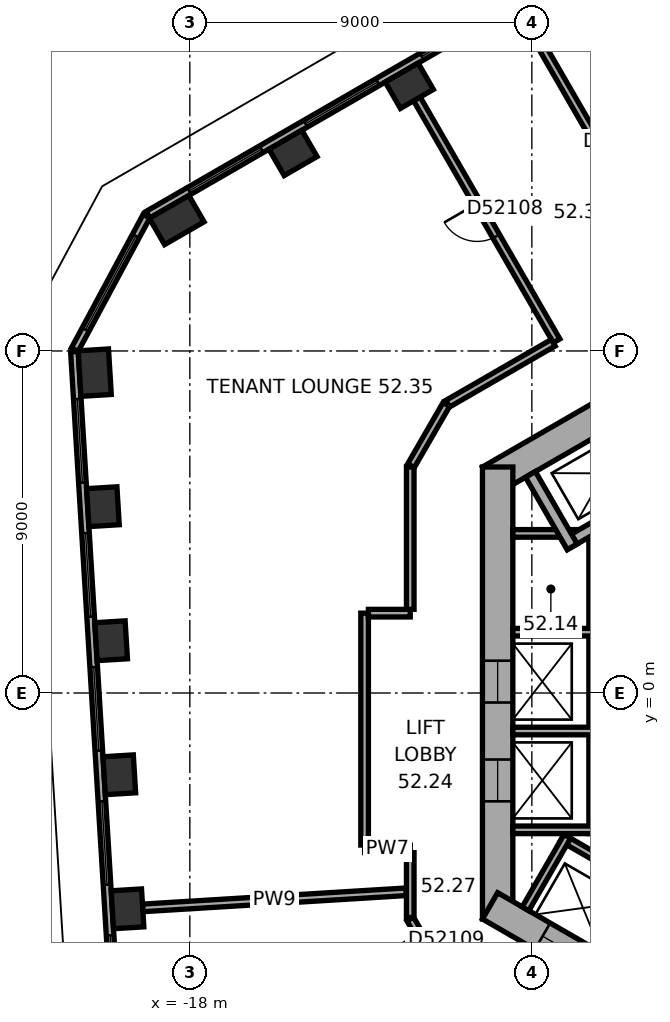
"""IFC4 building model, lengths in metres.
Left out: names, types, materials, properties, quantities, classifications, styles, units other than length and angle.
Written with IfcOpenShell. Run it as: python <this file> out.ifc"""

import sys

from ifc_helpers import new_model, si_unit, direction, frame, frame_2d, origin, origin_2d, place, context, subcontext, project, spatial, rectangle, extrude, element, fill, save


model = new_model("IFC4")
c1 = context("Model", 3, precision=1e-05, world=origin(), true_north=direction((0.0, 1.0)))
c2 = subcontext(c1, "Body", "Model", "MODEL_VIEW")
j1 = project(units=[si_unit("LENGTHUNIT", "METRE"), si_unit("PLANEANGLEUNIT", "RADIAN")], contexts=[c1])
p1 = place(None, origin())
s1 = spatial("IfcSite", under=j1, at=p1, CompositionType="ELEMENT")
p2 = place(p1, origin())
s2 = spatial("IfcBuilding", under=s1, at=p2, CompositionType="ELEMENT")
p3 = place(p2, frame((0.0, 0.0, 210.6)))
s3 = spatial("IfcBuildingStorey", under=s2, at=p3, CompositionType="ELEMENT", Elevation=210.6)
for number, where, z_axis, x_axis in (
    (1, (-12.225, 15.978, 0.0), (0.0, 0.0, 1.0), (-0.866, -0.5, 0.0)),
    (2, (-15.285, 14.211, 0.0), (0.0, 0.0, 1.0), (-0.866, -0.5, 0.0)),
):
    element("IfcColumn", number, at=place(p3, frame(where, z_axis=z_axis, x_axis=x_axis)), inside=s3, PredefinedType="COLUMN", context=c2, shape_type="SweptSolid", body=[
        extrude(rectangle(XDim=1.0, YDim=0.8, at=origin_2d()), origin(), (0.0, 0.0, 1.0), 3.7),
    ])
for number, where, z_axis, x_axis in (
    (3, (-18.345, 12.445, 0.0), (0.0, 0.0, 1.0), (-0.866, -0.5, 0.0)),
    (4, (-20.503, 8.429, 0.0), (0.0, 0.0, 1.0), (0.061, -0.998, 0.0)),
):
    element("IfcColumn", number, at=place(p3, frame(where, z_axis=z_axis, x_axis=x_axis)), inside=s3, PredefinedType="COLUMN", context=c2, shape_type="SweptSolid", body=[
        extrude(rectangle(XDim=1.2, YDim=0.8, at=origin_2d()), origin(), (0.0, 0.0, 1.0), 3.7),
    ])
for number, where, z_axis, x_axis in (
    (5, (-20.287, 4.902, 0.0), (0.0, 0.0, 1.0), (0.061, -0.998, 0.0)),
    (6, (-20.071, 1.375, 0.0), (0.0, 0.0, 1.0), (0.061, -0.998, 0.0)),
    (7, (-19.856, -2.152, 0.0), (0.0, 0.0, 1.0), (0.061, -0.998, 0.0)),
    (8, (-19.64, -5.679, 0.0), (0.0, 0.0, 1.0), (0.061, -0.998, 0.0)),
):
    element("IfcColumn", number, at=place(p3, frame(where, z_axis=z_axis, x_axis=x_axis)), inside=s3, PredefinedType="COLUMN", context=c2, shape_type="SweptSolid", body=[
        extrude(rectangle(XDim=1.0, YDim=0.8, at=origin_2d()), origin(), (0.0, 0.0, 1.0), 3.7),
    ])
p4 = place(p3, frame((0.2, 11.547, 0.0), z_axis=(0.0, 0.0, 1.0), x_axis=(-0.866023897231, -0.500002609418, 0.0)))
e9 = element("IfcWall", 9, at=p4, inside=s3, PredefinedType="SHEAR", context=c2, shape_type="SweptSolid", body=[
    extrude(rectangle(XDim=11.894, YDim=0.8, at=frame_2d((5.947, 0.0))), origin(), (0.0, 0.0, 1.0), 3.7),
])
p5 = place(p4, frame((6.147, 0.0, 0.0)))
e10 = element("IfcOpeningElement", 10, at=p5, cuts=e9, PredefinedType="OPENING", context=c2, shape_type="SweptSolid", body=[
    extrude(rectangle(XDim=1.5, YDim=2.1, at=frame_2d((0.75, 1.05))), frame((0.0, 0.41, 0.0), z_axis=(0.0, -1.0, 0.0), x_axis=(1.0, 0.0, 0.0)), (0.0, 0.0, 1.0), 0.82),
])
p6 = place(p4, frame((2.997, 0.0, 0.0)))
e11 = element("IfcOpeningElement", 11, at=p6, cuts=e9, PredefinedType="OPENING", context=c2, shape_type="SweptSolid", body=[
    extrude(rectangle(XDim=0.9, YDim=2.1, at=frame_2d((0.45, 1.05))), frame((0.0, 0.41, 0.0), z_axis=(0.0, -1.0, 0.0), x_axis=(1.0, 0.0, 0.0)), (0.0, 0.0, 1.0), 0.82),
])
p7 = place(p3, frame((-9.9, 5.947, 0.0), z_axis=(0.0, 0.0, 1.0), x_axis=(0.0, -1.0, 0.0)))
e12 = element("IfcWall", 12, at=p7, inside=s3, PredefinedType="SHEAR", context=c2, shape_type="SweptSolid", body=[
    extrude(rectangle(XDim=11.894, YDim=0.8, at=frame_2d((5.947, 0.0))), origin(), (0.0, 0.0, 1.0), 3.7),
])
p8 = place(p7, frame((5.097, 0.0, 0.0)))
e13 = element("IfcOpeningElement", 13, at=p8, cuts=e12, PredefinedType="OPENING", context=c2, shape_type="SweptSolid", body=[
    extrude(rectangle(XDim=1.1, YDim=2.1, at=frame_2d((0.55, 1.05))), frame((0.0, 0.41, 0.0), z_axis=(0.0, -1.0, 0.0), x_axis=(1.0, 0.0, 0.0)), (0.0, 0.0, 1.0), 0.82),
])
p9 = place(p7, frame((7.697, 0.0, 0.0)))
e14 = element("IfcOpeningElement", 14, at=p9, cuts=e12, PredefinedType="OPENING", context=c2, shape_type="SweptSolid", body=[
    extrude(rectangle(XDim=1.1, YDim=2.1, at=frame_2d((0.55, 1.05))), frame((0.0, 0.41, 0.0), z_axis=(0.0, -1.0, 0.0), x_axis=(1.0, 0.0, 0.0)), (0.0, 0.0, 1.0), 0.82),
])
p10 = place(p3, frame((-10.1, -5.6, 0.0), z_axis=(0.0, 0.0, 1.0), x_axis=(0.866023897231, -0.500002609418, 0.0)))
e15 = element("IfcWall", 15, at=p10, inside=s3, PredefinedType="SHEAR", context=c2, shape_type="SweptSolid", body=[
    extrude(rectangle(XDim=11.894, YDim=0.8, at=frame_2d((5.947, 0.0))), origin(), (0.0, 0.0, 1.0), 3.7),
])
p11 = place(p10, frame((6.147, 0.0, 0.0)))
e16 = element("IfcOpeningElement", 16, at=p11, cuts=e15, PredefinedType="OPENING", context=c2, shape_type="SweptSolid", body=[
    extrude(rectangle(XDim=1.5, YDim=2.1, at=frame_2d((0.75, 1.05))), frame((0.0, 0.41, 0.0), z_axis=(0.0, -1.0, 0.0), x_axis=(1.0, 0.0, 0.0)), (0.0, 0.0, 1.0), 0.82),
])
p12 = place(p10, frame((1.597, 0.0, 0.0)))
e17 = element("IfcOpeningElement", 17, at=p12, cuts=e15, PredefinedType="OPENING", context=c2, shape_type="SweptSolid", body=[
    extrude(rectangle(XDim=1.1, YDim=2.1, at=frame_2d((0.55, 1.05))), frame((0.0, 0.41, 0.0), z_axis=(0.0, -1.0, 0.0), x_axis=(1.0, 0.0, 0.0)), (0.0, 0.0, 1.0), 0.82),
])
p13 = place(p10, frame((4.197, 0.0, 0.0)))
e18 = element("IfcOpeningElement", 18, at=p13, cuts=e15, PredefinedType="OPENING", context=c2, shape_type="SweptSolid", body=[
    extrude(rectangle(XDim=1.1, YDim=2.1, at=frame_2d((0.55, 1.05))), frame((0.0, 0.41, 0.0), z_axis=(0.0, -1.0, 0.0), x_axis=(1.0, 0.0, 0.0)), (0.0, 0.0, 1.0), 0.82),
])
p14 = place(p3, frame((-2.786, 22.005, 0.0), z_axis=(0.0, 0.0, 1.0), x_axis=(-0.866026555358, -0.49999800541, 0.0)))
e19 = element("IfcWall", 19, at=p14, inside=s3, PredefinedType="STANDARD", context=c2, shape_type="SweptSolid", body=[
    extrude(rectangle(XDim=18.841, YDim=0.2, at=frame_2d((9.421, 0.0))), origin(), (0.0, 0.0, 1.0), 3.7),
])
p15 = place(p14, frame((1.254, 0.0, 0.9)))
e20 = element("IfcOpeningElement", 20, at=p15, cuts=e19, PredefinedType="OPENING", context=c2, shape_type="SweptSolid", body=[
    extrude(rectangle(XDim=2.2, YDim=2.0, at=frame_2d((1.1, 1.0))), frame((0.0, 0.11, 0.0), z_axis=(0.0, -1.0, 0.0), x_axis=(1.0, 0.0, 0.0)), (0.0, 0.0, 1.0), 0.22),
])
p16 = place(p14, frame((4.788, 0.0, 0.9)))
e21 = element("IfcOpeningElement", 21, at=p16, cuts=e19, PredefinedType="OPENING", context=c2, shape_type="SweptSolid", body=[
    extrude(rectangle(XDim=2.2, YDim=2.0, at=frame_2d((1.1, 1.0))), frame((0.0, 0.11, 0.0), z_axis=(0.0, -1.0, 0.0), x_axis=(1.0, 0.0, 0.0)), (0.0, 0.0, 1.0), 0.22),
])
p17 = place(p14, frame((8.321, 0.0, 0.9)))
e22 = element("IfcOpeningElement", 22, at=p17, cuts=e19, PredefinedType="OPENING", context=c2, shape_type="SweptSolid", body=[
    extrude(rectangle(XDim=2.2, YDim=2.0, at=frame_2d((1.1, 1.0))), frame((0.0, 0.11, 0.0), z_axis=(0.0, -1.0, 0.0), x_axis=(1.0, 0.0, 0.0)), (0.0, 0.0, 1.0), 0.22),
])
p18 = place(p14, frame((11.855, 0.0, 0.9)))
e23 = element("IfcOpeningElement", 23, at=p18, cuts=e19, PredefinedType="OPENING", context=c2, shape_type="SweptSolid", body=[
    extrude(rectangle(XDim=2.2, YDim=2.0, at=frame_2d((1.1, 1.0))), frame((0.0, 0.11, 0.0), z_axis=(0.0, -1.0, 0.0), x_axis=(1.0, 0.0, 0.0)), (0.0, 0.0, 1.0), 0.22),
])
p19 = place(p14, frame((15.389, 0.0, 0.9)))
e24 = element("IfcOpeningElement", 24, at=p19, cuts=e19, PredefinedType="OPENING", context=c2, shape_type="SweptSolid", body=[
    extrude(rectangle(XDim=2.2, YDim=2.0, at=frame_2d((1.1, 1.0))), frame((0.0, 0.11, 0.0), z_axis=(0.0, -1.0, 0.0), x_axis=(1.0, 0.0, 0.0)), (0.0, 0.0, 1.0), 0.22),
])
p20 = place(p3, frame((-19.141, 12.545, 0.0), z_axis=(0.0, 0.0, 1.0), x_axis=(-0.473306370921, -0.880897882416, 0.0)))
e25 = element("IfcWall", 25, at=p20, inside=s3, PredefinedType="STANDARD", context=c2, shape_type="SweptSolid", body=[
    extrude(rectangle(XDim=3.983, YDim=0.2, at=frame_2d((1.991, 0.0))), origin(), (0.0, 0.0, 1.0), 3.7),
])
p21 = place(p20, frame((0.591, 0.0, 0.9)))
e26 = element("IfcOpeningElement", 26, at=p21, cuts=e25, PredefinedType="OPENING", context=c2, shape_type="SweptSolid", body=[
    extrude(rectangle(XDim=2.8, YDim=2.0, at=frame_2d((1.4, 1.0))), frame((0.0, 0.11, 0.0), z_axis=(0.0, -1.0, 0.0), x_axis=(1.0, 0.0, 0.0)), (0.0, 0.0, 1.0), 0.22),
])
p22 = place(p3, frame((-21.038, 8.984, 0.0), z_axis=(0.0, 0.0, 1.0), x_axis=(0.061043935634, -0.998135079998, 0.0)))
e27 = element("IfcWall", 27, at=p22, inside=s3, PredefinedType="STANDARD", context=c2, shape_type="SweptSolid", body=[
    extrude(rectangle(XDim=18.841, YDim=0.2, at=frame_2d((9.421, 0.0))), origin(), (0.0, 0.0, 1.0), 3.7),
])
p23 = place(p22, frame((1.253, 0.0, 0.9)))
e28 = element("IfcOpeningElement", 28, at=p23, cuts=e27, PredefinedType="OPENING", context=c2, shape_type="SweptSolid", body=[
    extrude(rectangle(XDim=2.2, YDim=2.0, at=frame_2d((1.1, 1.0))), frame((0.0, 0.11, 0.0), z_axis=(0.0, -1.0, 0.0), x_axis=(1.0, 0.0, 0.0)), (0.0, 0.0, 1.0), 0.22),
])
p24 = place(p22, frame((4.786, 0.0, 0.9)))
e29 = element("IfcOpeningElement", 29, at=p24, cuts=e27, PredefinedType="OPENING", context=c2, shape_type="SweptSolid", body=[
    extrude(rectangle(XDim=2.2, YDim=2.0, at=frame_2d((1.1, 1.0))), frame((0.0, 0.11, 0.0), z_axis=(0.0, -1.0, 0.0), x_axis=(1.0, 0.0, 0.0)), (0.0, 0.0, 1.0), 0.22),
])
p25 = place(p22, frame((8.32, 0.0, 0.9)))
e30 = element("IfcOpeningElement", 30, at=p25, cuts=e27, PredefinedType="OPENING", context=c2, shape_type="SweptSolid", body=[
    extrude(rectangle(XDim=2.2, YDim=2.0, at=frame_2d((1.1, 1.0))), frame((0.0, 0.11, 0.0), z_axis=(0.0, -1.0, 0.0), x_axis=(1.0, 0.0, 0.0)), (0.0, 0.0, 1.0), 0.22),
])
p26 = place(p22, frame((11.854, 0.0, 0.9)))
e31 = element("IfcOpeningElement", 31, at=p26, cuts=e27, PredefinedType="OPENING", context=c2, shape_type="SweptSolid", body=[
    extrude(rectangle(XDim=2.2, YDim=2.0, at=frame_2d((1.1, 1.0))), frame((0.0, 0.11, 0.0), z_axis=(0.0, -1.0, 0.0), x_axis=(1.0, 0.0, 0.0)), (0.0, 0.0, 1.0), 0.22),
])
p27 = place(p22, frame((15.387, 0.0, 0.9)))
e32 = element("IfcOpeningElement", 32, at=p27, cuts=e27, PredefinedType="OPENING", context=c2, shape_type="SweptSolid", body=[
    extrude(rectangle(XDim=2.2, YDim=2.0, at=frame_2d((1.1, 1.0))), frame((0.0, 0.11, 0.0), z_axis=(0.0, -1.0, 0.0), x_axis=(1.0, 0.0, 0.0)), (0.0, 0.0, 1.0), 0.22),
])
p28 = place(p3, frame((-7.4, 4.3, 0.0), z_axis=(0.0, 0.0, 1.0), x_axis=(0.0, -1.0, 0.0)))
e33 = element("IfcWall", 33, at=p28, inside=s3, PredefinedType="PARTITIONING", context=c2, shape_type="SweptSolid", body=[
    extrude(rectangle(XDim=8.0, YDim=0.2, at=frame_2d((4.0, 0.0))), origin(), (0.0, 0.0, 1.0), 3.35),
])
for number, where, z_axis, x_axis in (
    (34, (-7.3, 4.2, 0.0), (0.0, 0.0, 1.0), (-1.0, 0.0, 0.0)),
    (35, (-7.3, 1.6, 0.0), (0.0, 0.0, 1.0), (-1.0, 0.0, 0.0)),
    (36, (-7.3, -1.0, 0.0), (0.0, 0.0, 1.0), (-1.0, 0.0, 0.0)),
    (37, (-7.3, -3.6, 0.0), (0.0, 0.0, 1.0), (-1.0, 0.0, 0.0)),
):
    element("IfcWall", number, at=place(p3, frame(where, z_axis=z_axis, x_axis=x_axis)), inside=s3, PredefinedType="PARTITIONING", context=c2, shape_type="SweptSolid", body=[
        extrude(rectangle(XDim=2.2, YDim=0.2, at=frame_2d((1.1, 0.0))), origin(), (0.0, 0.0, 1.0), 3.35),
    ])
p29 = place(p3, frame((-8.203, -3.809, 0.0), z_axis=(0.0, 0.0, 1.0), x_axis=(0.866028230842, -0.499995103361, 0.0)))
e38 = element("IfcWall", 38, at=p29, inside=s3, PredefinedType="PARTITIONING", context=c2, shape_type="SweptSolid", body=[
    extrude(rectangle(XDim=5.4, YDim=0.2, at=frame_2d((2.7, 0.0))), origin(), (0.0, 0.0, 1.0), 3.35),
])
p30 = place(p3, frame((-8.067, -3.772, 0.0), z_axis=(0.0, 0.0, 1.0), x_axis=(-0.50002983664, -0.866008176907, 0.0)))
e39 = element("IfcWall", 39, at=p30, inside=s3, PredefinedType="PARTITIONING", context=c2, shape_type="SweptSolid", body=[
    extrude(rectangle(XDim=2.2, YDim=0.2, at=frame_2d((1.1, 0.0))), origin(), (0.0, 0.0, 1.0), 3.35),
])
p31 = place(p3, frame((-5.24, 5.577, 0.0), z_axis=(0.0, 0.0, 1.0), x_axis=(-0.866014461049, -0.500018952895, 0.0)))
e40 = element("IfcWall", 40, at=p31, inside=s3, PredefinedType="SHEAR", context=c2, shape_type="SweptSolid", body=[
    extrude(rectangle(XDim=3.35, YDim=0.3, at=frame_2d((1.675, 0.0))), origin(), (0.0, 0.0, 1.0), 3.35),
])
p32 = place(p3, frame((-7.937, 3.847, 0.0), z_axis=(0.0, 0.0, 1.0), x_axis=(-0.50002983664, 0.866008176907, 0.0)))
e41 = element("IfcWall", 41, at=p32, inside=s3, PredefinedType="SHEAR", context=c2, shape_type="SweptSolid", body=[
    extrude(rectangle(XDim=2.2, YDim=0.3, at=frame_2d((1.1, 0.0))), origin(), (0.0, 0.0, 1.0), 3.35),
])
p33 = place(p3, frame((-19.241, -5.654, 0.0), z_axis=(0.0, 0.0, 1.0), x_axis=(0.998135538818, 0.061036432963, 0.0)))
e42 = element("IfcWall", 42, at=p33, inside=s3, PredefinedType="PARTITIONING", context=c2, shape_type="SweptSolid", body=[
    extrude(rectangle(XDim=6.944, YDim=0.2, at=frame_2d((3.472, 0.0))), origin(), (0.0, 0.0, 1.0), 2.65),
])
p34 = place(p3, frame((-13.401, -4.101, 0.0), z_axis=(0.0, 0.0, 1.0), x_axis=(1.0, 0.0, 0.0)))
e43 = element("IfcWall", 43, at=p34, inside=s3, PredefinedType="PARTITIONING", context=c2, shape_type="SweptSolid", body=[
    extrude(rectangle(XDim=1.201, YDim=0.2, at=frame_2d((0.601, 0.0))), origin(), (0.0, 0.0, 1.0), 3.35),
])
p35 = place(p3, frame((-13.401, 2.101, 0.0), z_axis=(0.0, 0.0, 1.0), x_axis=(0.0, -1.0, 0.0)))
e44 = element("IfcWall", 44, at=p35, inside=s3, PredefinedType="PARTITIONING", context=c2, shape_type="SweptSolid", body=[
    extrude(rectangle(XDim=6.102, YDim=0.2, at=frame_2d((3.051, 0.0))), origin(), (0.0, 0.0, 1.0), 3.35),
])
p36 = place(p3, frame((-12.2, -5.947, 0.0), z_axis=(0.0, 0.0, 1.0), x_axis=(0.500022797313, -0.86601224135, 0.0)))
e45 = element("IfcWall", 45, at=p36, inside=s3, PredefinedType="PARTITIONING", context=c2, shape_type="SweptSolid", body=[
    extrude(rectangle(XDim=1.9, YDim=0.2, at=frame_2d((0.95, 0.0))), origin(), (0.0, 0.0, 1.0), 3.35),
])
p37 = place(p36, frame((0.45, 0.0, 0.0)))
e46 = element("IfcOpeningElement", 46, at=p37, cuts=e45, PredefinedType="OPENING", context=c2, shape_type="SweptSolid", body=[
    extrude(rectangle(XDim=1.0, YDim=2.1, at=frame_2d((0.5, 1.05))), frame((0.0, 0.11, 0.0), z_axis=(0.0, -1.0, 0.0), x_axis=(1.0, 0.0, 0.0)), (0.0, 0.0, 1.0), 0.22),
])
p38 = place(p3, frame((-12.2, -4.201, 0.0), z_axis=(0.0, 0.0, 1.0), x_axis=(0.0, -1.0, 0.0)))
e47 = element("IfcWall", 47, at=p38, inside=s3, PredefinedType="PARTITIONING", context=c2, shape_type="SweptSolid", body=[
    extrude(rectangle(XDim=1.706, YDim=0.2, at=frame_2d((0.853, 0.0))), origin(), (0.0, 0.0, 1.0), 3.35),
])
p39 = place(p3, frame((-12.2, 2.101, 0.0), z_axis=(0.0, 0.0, 1.0), x_axis=(-1.0, 0.0, 0.0)))
e48 = element("IfcWall", 48, at=p39, inside=s3, PredefinedType="PARTITIONING", context=c2, shape_type="SweptSolid", body=[
    extrude(rectangle(XDim=1.101, YDim=0.2, at=frame_2d((0.551, 0.0))), origin(), (0.0, 0.0, 1.0), 3.35),
])
p40 = place(p3, frame((-12.2, 5.947, 0.0), z_axis=(0.0, 0.0, 1.0), x_axis=(0.0, -1.0, 0.0)))
e49 = element("IfcWall", 49, at=p40, inside=s3, PredefinedType="PARTITIONING", context=c2, shape_type="SweptSolid", body=[
    extrude(rectangle(XDim=3.746, YDim=0.2, at=frame_2d((1.873, 0.0))), origin(), (0.0, 0.0, 1.0), 3.35),
])
p41 = place(p3, frame((-12.025, 15.632, 0.0), z_axis=(0.0, 0.0, 1.0), x_axis=(0.499983153418, -0.866035129944, 0.0)))
e50 = element("IfcWall", 50, at=p41, inside=s3, PredefinedType="PARTITIONING", context=c2, shape_type="SweptSolid", body=[
    extrude(rectangle(XDim=7.35, YDim=0.2, at=frame_2d((3.675, 0.0))), origin(), (0.0, 0.0, 1.0), 3.35),
])
p42 = place(p41, frame((3.175, 0.0, 0.0)))
e51 = element("IfcOpeningElement", 51, at=p42, cuts=e50, PredefinedType="OPENING", context=c2, shape_type="SweptSolid", body=[
    extrude(rectangle(XDim=1.0, YDim=2.1, at=frame_2d((0.5, 1.05))), frame((0.0, 0.11, 0.0), z_axis=(0.0, -1.0, 0.0), x_axis=(1.0, 0.0, 0.0)), (0.0, 0.0, 1.0), 0.22),
])
p43 = place(p3, frame((-11.25, 7.592, 0.0), z_axis=(0.0, 0.0, 1.0), x_axis=(-0.499964847546, -0.866045698112, 0.0)))
e52 = element("IfcWall", 52, at=p43, inside=s3, PredefinedType="PARTITIONING", context=c2, shape_type="SweptSolid", body=[
    extrude(rectangle(XDim=1.86, YDim=0.2, at=frame_2d((0.93, 0.0))), origin(), (0.0, 0.0, 1.0), 3.35),
])
p44 = place(p3, frame((-8.965, 17.399, 0.0), z_axis=(0.0, 0.0, 1.0), x_axis=(0.499993683172, -0.866029050776, 0.0)))
e53 = element("IfcWall", 53, at=p44, inside=s3, PredefinedType="PARTITIONING", context=c2, shape_type="SweptSolid", body=[
    extrude(rectangle(XDim=7.35, YDim=0.2, at=frame_2d((3.675, 0.0))), origin(), (0.0, 0.0, 1.0), 2.65),
])
p45 = place(p44, frame((3.175, 0.0, 0.0)))
e54 = element("IfcOpeningElement", 54, at=p45, cuts=e53, PredefinedType="OPENING", context=c2, shape_type="SweptSolid", body=[
    extrude(rectangle(XDim=1.0, YDim=2.1, at=frame_2d((0.5, 1.05))), frame((0.0, 0.11, 0.0), z_axis=(0.0, -1.0, 0.0), x_axis=(1.0, 0.0, 0.0)), (0.0, 0.0, 1.0), 0.22),
])
p46 = place(p3, frame((-8.437, 9.217, 0.0), z_axis=(0.0, 0.0, 1.0), x_axis=(-0.866005660673, -0.500034194513, 0.0)))
e55 = element("IfcWall", 55, at=p46, inside=s3, PredefinedType="PARTITIONING", context=c2, shape_type="SweptSolid", body=[
    extrude(rectangle(XDim=3.209, YDim=0.2, at=frame_2d((1.604, 0.0))), origin(), (0.0, 0.0, 1.0), 3.35),
])
p47 = place(p17, origin())
e56 = element("IfcWindow", 56, at=p47, inside=s3, PartitioningType="SINGLE_PANEL", PredefinedType="WINDOW", context=c2, shape_type="SweptSolid", body=[
    extrude(rectangle(XDim=2.2, YDim=2.0, at=frame_2d((1.1, 1.0))), frame((0.0, 0.03, 0.0), z_axis=(0.0, -1.0, 0.0), x_axis=(1.0, 0.0, 0.0)), (0.0, 0.0, 1.0), 0.06),
])
fill(e22, e56)
p48 = place(p18, origin())
e57 = element("IfcWindow", 57, at=p48, inside=s3, PartitioningType="SINGLE_PANEL", PredefinedType="WINDOW", context=c2, shape_type="SweptSolid", body=[
    extrude(rectangle(XDim=2.2, YDim=2.0, at=frame_2d((1.1, 1.0))), frame((0.0, 0.03, 0.0), z_axis=(0.0, -1.0, 0.0), x_axis=(1.0, 0.0, 0.0)), (0.0, 0.0, 1.0), 0.06),
])
fill(e23, e57)
p49 = place(p19, origin())
e58 = element("IfcWindow", 58, at=p49, inside=s3, PartitioningType="SINGLE_PANEL", PredefinedType="WINDOW", context=c2, shape_type="SweptSolid", body=[
    extrude(rectangle(XDim=2.2, YDim=2.0, at=frame_2d((1.1, 1.0))), frame((0.0, 0.03, 0.0), z_axis=(0.0, -1.0, 0.0), x_axis=(1.0, 0.0, 0.0)), (0.0, 0.0, 1.0), 0.06),
])
fill(e24, e58)
p50 = place(p21, origin())
e59 = element("IfcWindow", 59, at=p50, inside=s3, PartitioningType="SINGLE_PANEL", PredefinedType="WINDOW", context=c2, shape_type="SweptSolid", body=[
    extrude(rectangle(XDim=2.8, YDim=2.0, at=frame_2d((1.4, 1.0))), frame((0.0, 0.03, 0.0), z_axis=(0.0, -1.0, 0.0), x_axis=(1.0, 0.0, 0.0)), (0.0, 0.0, 1.0), 0.06),
])
fill(e26, e59)
p51 = place(p23, origin())
e60 = element("IfcWindow", 60, at=p51, inside=s3, PartitioningType="SINGLE_PANEL", PredefinedType="WINDOW", context=c2, shape_type="SweptSolid", body=[
    extrude(rectangle(XDim=2.2, YDim=2.0, at=frame_2d((1.1, 1.0))), frame((0.0, 0.03, 0.0), z_axis=(0.0, -1.0, 0.0), x_axis=(1.0, 0.0, 0.0)), (0.0, 0.0, 1.0), 0.06),
])
fill(e28, e60)
p52 = place(p24, origin())
e61 = element("IfcWindow", 61, at=p52, inside=s3, PartitioningType="SINGLE_PANEL", PredefinedType="WINDOW", context=c2, shape_type="SweptSolid", body=[
    extrude(rectangle(XDim=2.2, YDim=2.0, at=frame_2d((1.1, 1.0))), frame((0.0, 0.03, 0.0), z_axis=(0.0, -1.0, 0.0), x_axis=(1.0, 0.0, 0.0)), (0.0, 0.0, 1.0), 0.06),
])
fill(e29, e61)
p53 = place(p25, origin())
e62 = element("IfcWindow", 62, at=p53, inside=s3, PartitioningType="SINGLE_PANEL", PredefinedType="WINDOW", context=c2, shape_type="SweptSolid", body=[
    extrude(rectangle(XDim=2.2, YDim=2.0, at=frame_2d((1.1, 1.0))), frame((0.0, 0.03, 0.0), z_axis=(0.0, -1.0, 0.0), x_axis=(1.0, 0.0, 0.0)), (0.0, 0.0, 1.0), 0.06),
])
fill(e30, e62)
p54 = place(p26, origin())
e63 = element("IfcWindow", 63, at=p54, inside=s3, PartitioningType="SINGLE_PANEL", PredefinedType="WINDOW", context=c2, shape_type="SweptSolid", body=[
    extrude(rectangle(XDim=2.2, YDim=2.0, at=frame_2d((1.1, 1.0))), frame((0.0, 0.03, 0.0), z_axis=(0.0, -1.0, 0.0), x_axis=(1.0, 0.0, 0.0)), (0.0, 0.0, 1.0), 0.06),
])
fill(e31, e63)
p55 = place(p27, origin())
e64 = element("IfcWindow", 64, at=p55, inside=s3, PartitioningType="SINGLE_PANEL", PredefinedType="WINDOW", context=c2, shape_type="SweptSolid", body=[
    extrude(rectangle(XDim=2.2, YDim=2.0, at=frame_2d((1.1, 1.0))), frame((0.0, 0.03, 0.0), z_axis=(0.0, -1.0, 0.0), x_axis=(1.0, 0.0, 0.0)), (0.0, 0.0, 1.0), 0.06),
])
fill(e32, e64)
p56 = place(p8, origin())
e65 = element("IfcDoor", 65, at=p56, inside=s3, OperationType="DOUBLE_DOOR_SLIDING", PredefinedType="DOOR", context=c2, shape_type="SweptSolid", body=[
    extrude(rectangle(XDim=1.1, YDim=2.1, at=frame_2d((0.55, 1.05))), frame((0.0, 0.025, 0.0), z_axis=(0.0, -1.0, 0.0), x_axis=(1.0, 0.0, 0.0)), (0.0, 0.0, 1.0), 0.05),
])
fill(e13, e65)
p57 = place(p9, origin())
e66 = element("IfcDoor", 66, at=p57, inside=s3, OperationType="DOUBLE_DOOR_SLIDING", PredefinedType="DOOR", context=c2, shape_type="SweptSolid", body=[
    extrude(rectangle(XDim=1.1, YDim=2.1, at=frame_2d((0.55, 1.05))), frame((0.0, 0.025, 0.0), z_axis=(0.0, -1.0, 0.0), x_axis=(1.0, 0.0, 0.0)), (0.0, 0.0, 1.0), 0.05),
])
fill(e14, e66)
p58 = place(p12, origin())
e67 = element("IfcDoor", 67, at=p58, inside=s3, OperationType="DOUBLE_DOOR_SLIDING", PredefinedType="DOOR", context=c2, shape_type="SweptSolid", body=[
    extrude(rectangle(XDim=1.1, YDim=2.1, at=frame_2d((0.55, 1.05))), frame((0.0, 0.025, 0.0), z_axis=(0.0, -1.0, 0.0), x_axis=(1.0, 0.0, 0.0)), (0.0, 0.0, 1.0), 0.05),
])
fill(e17, e67)
p59 = place(p42, origin())
e68 = element("IfcDoor", 68, at=p59, inside=s3, OperationType="SINGLE_SWING_LEFT", PredefinedType="DOOR", context=c2, shape_type="SweptSolid", body=[
    extrude(rectangle(XDim=1.0, YDim=2.1, at=frame_2d((0.5, 1.05))), frame((0.0, 0.025, 0.0), z_axis=(0.0, -1.0, 0.0), x_axis=(1.0, 0.0, 0.0)), (0.0, 0.0, 1.0), 0.05),
])
fill(e51, e68)
p60 = place(p37, origin())
e69 = element("IfcDoor", 69, at=p60, inside=s3, OperationType="SINGLE_SWING_LEFT", PredefinedType="DOOR", context=c2, shape_type="SweptSolid", body=[
    extrude(rectangle(XDim=1.0, YDim=2.1, at=frame_2d((0.5, 1.05))), frame((0.0, 0.025, 0.0), z_axis=(0.0, -1.0, 0.0), x_axis=(1.0, 0.0, 0.0)), (0.0, 0.0, 1.0), 0.05),
])
fill(e46, e69)
save(model, sys.argv[1])
